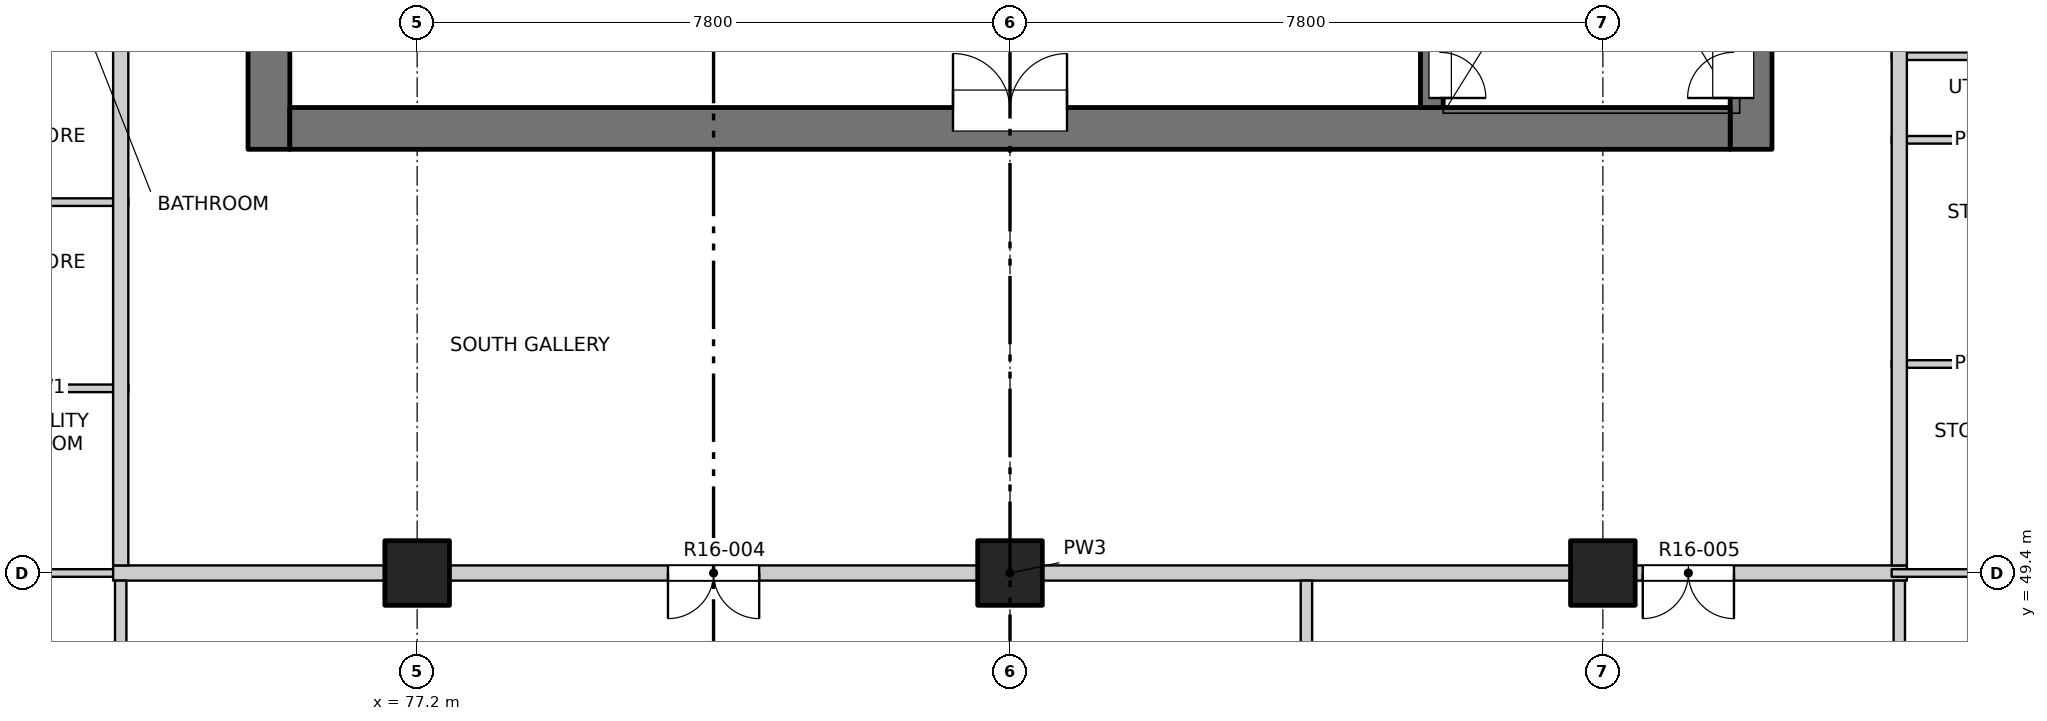
"""IFC4 building model, lengths in metres.
Left out: names, types, materials, properties, quantities, classifications, styles, units other than length and angle.
Written with IfcOpenShell. Run it as: python <this file> out.ifc"""

import sys

from ifc_helpers import new_model, si_unit, direction, frame, frame_2d, origin, origin_2d, place, context, subcontext, project, spatial, rectangle, extrude, element, fill, save


model = new_model("IFC4")
c1 = context("Model", 3, precision=1e-05, world=origin(), true_north=direction((0.0, 1.0)))
c2 = subcontext(c1, "Body", "Model", "MODEL_VIEW")
j1 = project(units=[si_unit("LENGTHUNIT", "METRE"), si_unit("PLANEANGLEUNIT", "RADIAN")], contexts=[c1])
p1 = place(None, origin())
s1 = spatial("IfcSite", under=j1, at=p1, CompositionType="ELEMENT")
p2 = place(p1, origin())
s2 = spatial("IfcBuilding", under=s1, at=p2, CompositionType="ELEMENT")
p3 = place(p2, frame((0.0, 0.0, 169.0)))
s3 = spatial("IfcBuildingStorey", under=s2, at=p3, CompositionType="ELEMENT", Elevation=169.0)
for number, where, z_axis, x_axis in (
    (1, (77.2, 49.4, -0.25), (0.0, 0.0, 1.0), (1.0, 0.0, 0.0)),
    (2, (85.0, 49.4, -0.25), (0.0, 0.0, 1.0), (1.0, 0.0, 0.0)),
    (3, (92.8, 49.4, -0.25), (0.0, 0.0, 1.0), (1.0, 0.0, 0.0)),
):
    element("IfcColumn", number, at=place(p3, frame(where, z_axis=z_axis, x_axis=x_axis)), inside=s3, PredefinedType="COLUMN", context=c2, shape_type="SweptSolid", body=[
        extrude(rectangle(XDim=0.85, YDim=0.85, at=origin_2d()), origin(), (0.0, 0.0, 1.0), 3.35),
    ])
p4 = place(p3, frame((75.25, 54.975, -0.25), z_axis=(0.0, 0.0, 1.0), x_axis=(0.0, 1.0, 0.0)))
e4 = element("IfcWall", 4, at=p4, inside=s3, PredefinedType="SOLIDWALL", context=c2, shape_type="SweptSolid", body=[
    extrude(rectangle(XDim=22.325, YDim=0.55, at=frame_2d((11.163, 0.0))), origin(), (0.0, 0.0, 1.0), 3.35),
])
p5 = place(p4, frame((7.475, 0.0, 0.25)))
e5 = element("IfcOpeningElement", 5, at=p5, cuts=e4, PredefinedType="OPENING", context=c2, shape_type="SweptSolid", body=[
    extrude(rectangle(XDim=0.9, YDim=2.1, at=frame_2d((0.45, 1.05))), frame((0.0, 0.285, 0.0), z_axis=(0.0, -1.0, 0.0), x_axis=(1.0, 0.0, 0.0)), (0.0, 0.0, 1.0), 0.57),
])
p6 = place(p4, frame((10.775, 0.0, 0.25)))
e6 = element("IfcOpeningElement", 6, at=p6, cuts=e4, PredefinedType="OPENING", context=c2, shape_type="SweptSolid", body=[
    extrude(rectangle(XDim=0.9, YDim=2.1, at=frame_2d((0.45, 1.05))), frame((0.0, 0.285, 0.0), z_axis=(0.0, -1.0, 0.0), x_axis=(1.0, 0.0, 0.0)), (0.0, 0.0, 1.0), 0.57),
])
p7 = place(p4, frame((13.775, 0.0, 0.25)))
e7 = element("IfcOpeningElement", 7, at=p7, cuts=e4, PredefinedType="OPENING", context=c2, shape_type="SweptSolid", body=[
    extrude(rectangle(XDim=0.9, YDim=2.1, at=frame_2d((0.45, 1.05))), frame((0.0, 0.285, 0.0), z_axis=(0.0, -1.0, 0.0), x_axis=(1.0, 0.0, 0.0)), (0.0, 0.0, 1.0), 0.57),
])
p8 = place(p4, frame((16.775, 0.0, 0.25)))
e8 = element("IfcOpeningElement", 8, at=p8, cuts=e4, PredefinedType="OPENING", context=c2, shape_type="SweptSolid", body=[
    extrude(rectangle(XDim=0.9, YDim=2.1, at=frame_2d((0.45, 1.05))), frame((0.0, 0.285, 0.0), z_axis=(0.0, -1.0, 0.0), x_axis=(1.0, 0.0, 0.0)), (0.0, 0.0, 1.0), 0.57),
])
p9 = place(p4, frame((20.075, 0.0, 0.25)))
e9 = element("IfcOpeningElement", 9, at=p9, cuts=e4, PredefinedType="OPENING", context=c2, shape_type="SweptSolid", body=[
    extrude(rectangle(XDim=0.9, YDim=2.1, at=frame_2d((0.45, 1.05))), frame((0.0, 0.285, 0.0), z_axis=(0.0, -1.0, 0.0), x_axis=(1.0, 0.0, 0.0)), (0.0, 0.0, 1.0), 0.57),
])
p10 = place(p3, frame((94.75, 54.975, -0.25), z_axis=(0.0, 0.0, 1.0), x_axis=(0.0, 1.0, 0.0)))
e10 = element("IfcWall", 10, at=p10, inside=s3, PredefinedType="SOLIDWALL", context=c2, shape_type="SweptSolid", body=[
    extrude(rectangle(XDim=6.975, YDim=0.55, at=frame_2d((3.487, 0.0))), origin(), (0.0, 0.0, 1.0), 3.35),
])
p11 = place(p10, frame((0.675, 0.0, 0.25)))
e11 = element("IfcOpeningElement", 11, at=p11, cuts=e10, PredefinedType="OPENING", context=c2, shape_type="SweptSolid", body=[
    extrude(rectangle(XDim=1.2, YDim=2.1, at=frame_2d((0.6, 1.05))), frame((0.0, 0.285, 0.0), z_axis=(0.0, -1.0, 0.0), x_axis=(1.0, 0.0, 0.0)), (0.0, 0.0, 1.0), 0.57),
])
p12 = place(p3, frame((75.525, 55.25, -0.25), z_axis=(0.0, 0.0, 1.0), x_axis=(1.0, 0.0, 0.0)))
e12 = element("IfcWall", 12, at=p12, inside=s3, PredefinedType="SOLIDWALL", context=c2, shape_type="SweptSolid", body=[
    extrude(rectangle(XDim=18.95, YDim=0.55, at=frame_2d((9.475, 0.0))), origin(), (0.0, 0.0, 1.0), 3.35),
])
p13 = place(p12, frame((8.725, 0.0, 0.25)))
e13 = element("IfcOpeningElement", 13, at=p13, cuts=e12, PredefinedType="OPENING", context=c2, shape_type="SweptSolid", body=[
    extrude(rectangle(XDim=1.5, YDim=2.1, at=frame_2d((0.75, 1.05))), frame((0.0, 0.285, 0.0), z_axis=(0.0, -1.0, 0.0), x_axis=(1.0, 0.0, 0.0)), (0.0, 0.0, 1.0), 0.57),
])
p14 = place(p3, frame((90.55, 55.525, -0.25), z_axis=(0.0, 0.0, 1.0), x_axis=(0.0, 1.0, 0.0)))
e14 = element("IfcWall", 14, at=p14, inside=s3, PredefinedType="SOLIDWALL", context=c2, shape_type="SweptSolid", body=[
    extrude(rectangle(XDim=6.425, YDim=0.3, at=frame_2d((3.212, 0.0))), origin(), (0.0, 0.0, 1.0), 3.35),
])
p15 = place(p14, frame((0.125, 0.0, 0.25)))
e15 = element("IfcOpeningElement", 15, at=p15, cuts=e14, PredefinedType="OPENING", context=c2, shape_type="SweptSolid", body=[
    extrude(rectangle(XDim=1.2, YDim=2.1, at=frame_2d((0.6, 1.05))), frame((0.0, 0.16, 0.0), z_axis=(0.0, -1.0, 0.0), x_axis=(1.0, 0.0, 0.0)), (0.0, 0.0, 1.0), 0.32),
])
p16 = place(p3, frame((65.8, 49.4, 0.0), z_axis=(0.0, 0.0, 1.0), x_axis=(1.0, 0.0, 0.0)))
e16 = element("IfcWall", 16, at=p16, inside=s3, PredefinedType="PARTITIONING", context=c2, shape_type="SweptSolid", body=[
    extrude(rectangle(XDim=7.6, YDim=0.1, at=frame_2d((3.8, 0.0))), origin(), (0.0, 0.0, 1.0), 3.1),
])
p17 = place(p16, frame((4.14, 0.0, 0.0)))
e17 = element("IfcOpeningElement", 17, at=p17, cuts=e16, PredefinedType="OPENING", context=c2, shape_type="SweptSolid", body=[
    extrude(rectangle(XDim=0.9, YDim=2.1, at=frame_2d((0.45, 1.05))), frame((0.0, 0.06, 0.0), z_axis=(0.0, -1.0, 0.0), x_axis=(1.0, 0.0, 0.0)), (0.0, 0.0, 1.0), 0.12),
])
p18 = place(p3, frame((73.2, 49.4, 0.0), z_axis=(0.0, 0.0, 1.0), x_axis=(1.0, 0.0, 0.0)))
e18 = element("IfcWall", 18, at=p18, inside=s3, PredefinedType="PARTITIONING", context=c2, shape_type="SweptSolid", body=[
    extrude(rectangle(XDim=23.6, YDim=0.2, at=frame_2d((11.8, 0.0))), origin(), (0.0, 0.0, 1.0), 3.1),
])
p19 = place(p18, frame((7.3, 0.0, 0.0)))
e19 = element("IfcOpeningElement", 19, at=p19, cuts=e18, PredefinedType="OPENING", context=c2, shape_type="SweptSolid", body=[
    extrude(rectangle(XDim=1.2, YDim=2.1, at=frame_2d((0.6, 1.05))), frame((0.0, 0.11, 0.0), z_axis=(0.0, -1.0, 0.0), x_axis=(1.0, 0.0, 0.0)), (0.0, 0.0, 1.0), 0.22),
])
p20 = place(p18, frame((20.125, 0.0, 0.0)))
e20 = element("IfcOpeningElement", 20, at=p20, cuts=e18, PredefinedType="OPENING", context=c2, shape_type="SweptSolid", body=[
    extrude(rectangle(XDim=1.2, YDim=2.1, at=frame_2d((0.6, 1.05))), frame((0.0, 0.11, 0.0), z_axis=(0.0, -1.0, 0.0), x_axis=(1.0, 0.0, 0.0)), (0.0, 0.0, 1.0), 0.22),
])
p21 = place(p3, frame((96.6, 49.4, 0.0), z_axis=(0.0, 0.0, 1.0), x_axis=(1.0, 0.0, 0.0)))
e21 = element("IfcWall", 21, at=p21, inside=s3, PredefinedType="PARTITIONING", context=c2, shape_type="SweptSolid", body=[
    extrude(rectangle(XDim=7.6, YDim=0.1, at=frame_2d((3.8, 0.0))), origin(), (0.0, 0.0, 1.0), 3.1),
])
p22 = place(p21, frame((2.56, 0.0, 0.0)))
e22 = element("IfcOpeningElement", 22, at=p22, cuts=e21, PredefinedType="OPENING", context=c2, shape_type="SweptSolid", body=[
    extrude(rectangle(XDim=0.9, YDim=2.1, at=frame_2d((0.45, 1.05))), frame((0.0, 0.06, 0.0), z_axis=(0.0, -1.0, 0.0), x_axis=(1.0, 0.0, 0.0)), (0.0, 0.0, 1.0), 0.12),
])
for number, where, z_axis, x_axis in (
    (23, (71.18, 51.83, 0.0), (0.0, 0.0, 1.0), (1.0, 0.0, 0.0)),
    (24, (96.6, 52.15, 0.0), (0.0, 0.0, 1.0), (1.0, 0.0, 0.0)),
    (25, (71.18, 54.28, 0.0), (0.0, 0.0, 1.0), (1.0, 0.0, 0.0)),
    (26, (96.6, 55.1, 0.0), (0.0, 0.0, 1.0), (1.0, 0.0, 0.0)),
    (27, (96.6, 56.2, 0.0), (0.0, 0.0, 1.0), (1.0, 0.0, 0.0)),
):
    element("IfcWall", number, at=place(p3, frame(where, z_axis=z_axis, x_axis=x_axis)), inside=s3, PredefinedType="PARTITIONING", context=c2, shape_type="SweptSolid", body=[
        extrude(rectangle(XDim=2.22, YDim=0.1, at=frame_2d((1.11, 0.0))), origin(), (0.0, 0.0, 1.0), 3.1),
    ])
p23 = place(p3, frame((73.3, 45.8, 0.0), z_axis=(0.0, 0.0, 1.0), x_axis=(0.0, 1.0, 0.0)))
e28 = element("IfcWall", 28, at=p23, inside=s3, PredefinedType="PARTITIONING", context=c2, shape_type="SweptSolid", body=[
    extrude(rectangle(XDim=3.5, YDim=0.15, at=frame_2d((1.75, 0.0))), origin(), (0.0, 0.0, 1.0), 3.1),
])
p24 = place(p3, frame((73.3, 49.5, 0.0), z_axis=(0.0, 0.0, 1.0), x_axis=(0.0, 1.0, 0.0)))
e29 = element("IfcWall", 29, at=p24, inside=s3, PredefinedType="PARTITIONING", context=c2, shape_type="SweptSolid", body=[
    extrude(rectangle(XDim=34.7, YDim=0.2, at=frame_2d((17.35, 0.0))), origin(), (0.0, 0.0, 1.0), 3.1),
])
p25 = place(p24, frame((14.275, 0.0, 0.0)))
e30 = element("IfcOpeningElement", 30, at=p25, cuts=e29, PredefinedType="OPENING", context=c2, shape_type="SweptSolid", body=[
    extrude(rectangle(XDim=1.0, YDim=2.1, at=frame_2d((0.5, 1.05))), frame((0.0, 0.11, 0.0), z_axis=(0.0, -1.0, 0.0), x_axis=(1.0, 0.0, 0.0)), (0.0, 0.0, 1.0), 0.22),
])
p26 = place(p24, frame((21.925, 0.0, 0.0)))
e31 = element("IfcOpeningElement", 31, at=p26, cuts=e29, PredefinedType="OPENING", context=c2, shape_type="SweptSolid", body=[
    extrude(rectangle(XDim=1.0, YDim=2.1, at=frame_2d((0.5, 1.05))), frame((0.0, 0.11, 0.0), z_axis=(0.0, -1.0, 0.0), x_axis=(1.0, 0.0, 0.0)), (0.0, 0.0, 1.0), 0.22),
])
p27 = place(p24, frame((29.125, 0.0, 0.0)))
e32 = element("IfcOpeningElement", 32, at=p27, cuts=e29, PredefinedType="OPENING", context=c2, shape_type="SweptSolid", body=[
    extrude(rectangle(XDim=1.0, YDim=2.1, at=frame_2d((0.5, 1.05))), frame((0.0, 0.11, 0.0), z_axis=(0.0, -1.0, 0.0), x_axis=(1.0, 0.0, 0.0)), (0.0, 0.0, 1.0), 0.22),
])
for number, where, z_axis, x_axis in (
    (33, (88.9, 45.8, 0.0), (0.0, 0.0, 1.0), (0.0, 1.0, 0.0)),
    (34, (96.7, 45.8, 0.0), (0.0, 0.0, 1.0), (0.0, 1.0, 0.0)),
):
    element("IfcWall", number, at=place(p3, frame(where, z_axis=z_axis, x_axis=x_axis)), inside=s3, PredefinedType="PARTITIONING", context=c2, shape_type="SweptSolid", body=[
        extrude(rectangle(XDim=3.5, YDim=0.15, at=frame_2d((1.75, 0.0))), origin(), (0.0, 0.0, 1.0), 3.1),
    ])
p28 = place(p3, frame((96.7, 49.5, 0.0), z_axis=(0.0, 0.0, 1.0), x_axis=(0.0, 1.0, 0.0)))
e35 = element("IfcWall", 35, at=p28, inside=s3, PredefinedType="PARTITIONING", context=c2, shape_type="SweptSolid", body=[
    extrude(rectangle(XDim=34.7, YDim=0.2, at=frame_2d((17.35, 0.0))), origin(), (0.0, 0.0, 1.0), 3.1),
])
p29 = place(p28, frame((6.875, 0.0, 0.0)))
e36 = element("IfcOpeningElement", 36, at=p29, cuts=e35, PredefinedType="OPENING", context=c2, shape_type="SweptSolid", body=[
    extrude(rectangle(XDim=1.0, YDim=2.1, at=frame_2d((0.5, 1.05))), frame((0.0, 0.11, 0.0), z_axis=(0.0, -1.0, 0.0), x_axis=(1.0, 0.0, 0.0)), (0.0, 0.0, 1.0), 0.22),
])
p30 = place(p28, frame((18.025, 0.0, 0.0)))
e37 = element("IfcOpeningElement", 37, at=p30, cuts=e35, PredefinedType="OPENING", context=c2, shape_type="SweptSolid", body=[
    extrude(rectangle(XDim=1.0, YDim=2.1, at=frame_2d((0.5, 1.05))), frame((0.0, 0.11, 0.0), z_axis=(0.0, -1.0, 0.0), x_axis=(1.0, 0.0, 0.0)), (0.0, 0.0, 1.0), 0.22),
])
p31 = place(p19, origin())
e38 = element("IfcDoor", 38, at=p31, inside=s3, OperationType="DOUBLE_DOOR_SINGLE_SWING", PredefinedType="DOOR", context=c2, shape_type="SweptSolid", body=[
    extrude(rectangle(XDim=1.2, YDim=2.1, at=frame_2d((0.6, 1.05))), frame((0.0, 0.025, 0.0), z_axis=(0.0, -1.0, 0.0), x_axis=(1.0, 0.0, 0.0)), (0.0, 0.0, 1.0), 0.05),
])
fill(e19, e38)
p32 = place(p20, origin())
e39 = element("IfcDoor", 39, at=p32, inside=s3, OperationType="DOUBLE_DOOR_SINGLE_SWING", PredefinedType="DOOR", context=c2, shape_type="SweptSolid", body=[
    extrude(rectangle(XDim=1.2, YDim=2.1, at=frame_2d((0.6, 1.05))), frame((0.0, 0.025, 0.0), z_axis=(0.0, -1.0, 0.0), x_axis=(1.0, 0.0, 0.0)), (0.0, 0.0, 1.0), 0.05),
])
fill(e20, e39)
p33 = place(p13, origin())
e40 = element("IfcDoor", 40, at=p33, inside=s3, OperationType="DOUBLE_DOOR_SINGLE_SWING", PredefinedType="DOOR", context=c2, shape_type="SweptSolid", body=[
    extrude(rectangle(XDim=1.5, YDim=2.1, at=frame_2d((0.75, 1.05))), frame((0.0, 0.26, 0.0), z_axis=(0.0, -1.0, 0.0), x_axis=(1.0, 0.0, 0.0)), (0.0, 0.0, 1.0), 0.05),
])
fill(e13, e40)
p34 = place(p15, origin())
e41 = element("IfcDoor", 41, at=p34, inside=s3, OperationType="DOUBLE_DOOR_SINGLE_SWING", PredefinedType="DOOR", context=c2, shape_type="SweptSolid", body=[
    extrude(rectangle(XDim=1.2, YDim=2.1, at=frame_2d((0.6, 1.05))), frame((0.0, -0.085, 0.0), z_axis=(0.0, -1.0, 0.0), x_axis=(1.0, 0.0, 0.0)), (0.0, 0.0, 1.0), 0.05),
])
fill(e15, e41)
p35 = place(p11, origin())
e42 = element("IfcDoor", 42, at=p35, inside=s3, OperationType="DOUBLE_DOOR_SINGLE_SWING", PredefinedType="DOOR", context=c2, shape_type="SweptSolid", body=[
    extrude(rectangle(XDim=1.2, YDim=2.1, at=frame_2d((0.6, 1.05))), frame((0.0, 0.26, 0.0), z_axis=(0.0, -1.0, 0.0), x_axis=(1.0, 0.0, 0.0)), (0.0, 0.0, 1.0), 0.05),
])
fill(e11, e42)
save(model, sys.argv[1])
